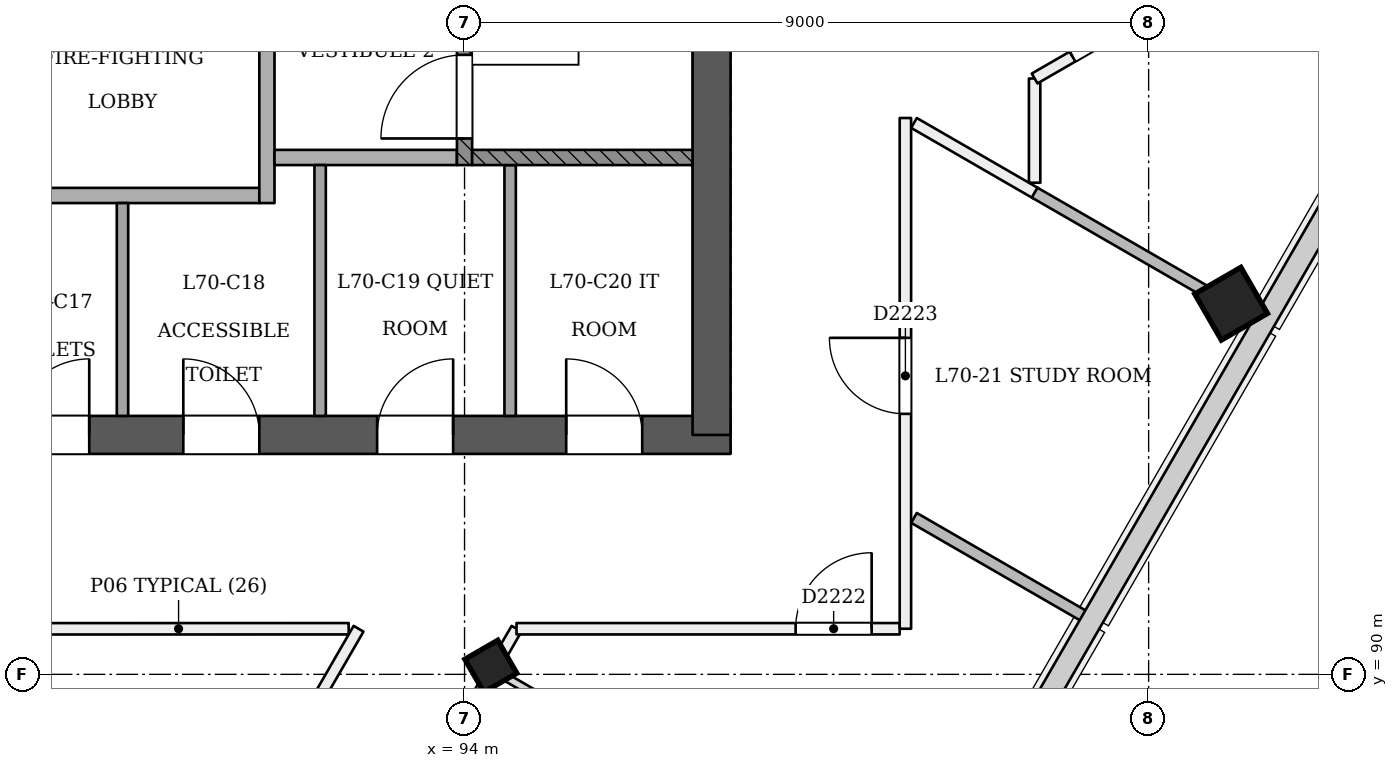
"""IFC4 building model, lengths in metres.
Left out: names, types, materials, properties, quantities, classifications, styles, units other than length and angle.
Written with IfcOpenShell. Run it as: python <this file> out.ifc"""

import sys

from ifc_helpers import new_model, si_unit, direction, frame, frame_2d, origin, origin_2d, place, context, subcontext, project, spatial, rectangle, extrude, element, fill, save


model = new_model("IFC4")
c1 = context("Model", 3, precision=1e-05, world=origin(), true_north=direction((0.0, 1.0)))
c2 = subcontext(c1, "Body", "Model", "MODEL_VIEW")
j1 = project(units=[si_unit("LENGTHUNIT", "METRE"), si_unit("PLANEANGLEUNIT", "RADIAN")], contexts=[c1])
p1 = place(None, origin())
s1 = spatial("IfcSite", under=j1, at=p1, CompositionType="ELEMENT")
p2 = place(p1, origin())
s2 = spatial("IfcBuilding", under=s1, at=p2, CompositionType="ELEMENT")
p3 = place(p2, frame((0.0, 0.0, 271.6)))
s3 = spatial("IfcBuildingStorey", under=s2, at=p3, CompositionType="ELEMENT", Elevation=271.6)
p4 = place(p3, frame((72.75, 93.15, 0.0), z_axis=(0.0, 0.0, 1.0), x_axis=(1.0, 0.0, 0.0)))
e1 = element("IfcWall", 1, at=p4, inside=s3, PredefinedType="SHEAR", context=c2, shape_type="SweptSolid", body=[
    extrude(rectangle(XDim=24.75, YDim=0.5, at=frame_2d((12.375, 0.0))), origin(), (0.0, 0.0, 1.0), 3.6),
])
p5 = place(p4, frame((1.05, 0.0, 0.0)))
e2 = element("IfcOpeningElement", 2, at=p5, cuts=e1, PredefinedType="OPENING", context=c2, shape_type="SweptSolid", body=[
    extrude(rectangle(XDim=1.2, YDim=2.1, at=frame_2d((0.6, 1.05))), frame((0.0, 0.26, 0.0), z_axis=(0.0, -1.0, 0.0), x_axis=(1.0, 0.0, 0.0)), (0.0, 0.0, 1.0), 0.521),
])
p6 = place(p4, frame((3.25, 0.0, 0.0)))
e3 = element("IfcOpeningElement", 3, at=p6, cuts=e1, PredefinedType="OPENING", context=c2, shape_type="SweptSolid", body=[
    extrude(rectangle(XDim=1.2, YDim=2.1, at=frame_2d((0.6, 1.05))), frame((0.0, 0.26, 0.0), z_axis=(0.0, -1.0, 0.0), x_axis=(1.0, 0.0, 0.0)), (0.0, 0.0, 1.0), 0.521),
])
p7 = place(p4, frame((13.25, 0.0, 0.0)))
e4 = element("IfcOpeningElement", 4, at=p7, cuts=e1, PredefinedType="OPENING", context=c2, shape_type="SweptSolid", body=[
    extrude(rectangle(XDim=1.2, YDim=2.1, at=frame_2d((0.6, 1.05))), frame((0.0, 0.26, 0.0), z_axis=(0.0, -1.0, 0.0), x_axis=(1.0, 0.0, 0.0)), (0.0, 0.0, 1.0), 0.521),
])
p8 = place(p4, frame((15.312, 0.0, 0.0)))
e5 = element("IfcOpeningElement", 5, at=p8, cuts=e1, PredefinedType="OPENING", context=c2, shape_type="SweptSolid", body=[
    extrude(rectangle(XDim=1.0, YDim=2.1, at=frame_2d((0.5, 1.05))), frame((0.0, 0.26, 0.0), z_axis=(0.0, -1.0, 0.0), x_axis=(1.0, 0.0, 0.0)), (0.0, 0.0, 1.0), 0.521),
])
p9 = place(p4, frame((17.55, 0.0, 0.0)))
e6 = element("IfcOpeningElement", 6, at=p9, cuts=e1, PredefinedType="OPENING", context=c2, shape_type="SweptSolid", body=[
    extrude(rectangle(XDim=1.0, YDim=2.1, at=frame_2d((0.5, 1.05))), frame((0.0, 0.26, 0.0), z_axis=(0.0, -1.0, 0.0), x_axis=(1.0, 0.0, 0.0)), (0.0, 0.0, 1.0), 0.521),
])
p10 = place(p4, frame((20.1, 0.0, 0.0)))
e7 = element("IfcOpeningElement", 7, at=p10, cuts=e1, PredefinedType="OPENING", context=c2, shape_type="SweptSolid", body=[
    extrude(rectangle(XDim=1.0, YDim=2.1, at=frame_2d((0.5, 1.05))), frame((0.0, 0.26, 0.0), z_axis=(0.0, -1.0, 0.0), x_axis=(1.0, 0.0, 0.0)), (0.0, 0.0, 1.0), 0.521),
])
p11 = place(p4, frame((22.587, 0.0, 0.0)))
e8 = element("IfcOpeningElement", 8, at=p11, cuts=e1, PredefinedType="OPENING", context=c2, shape_type="SweptSolid", body=[
    extrude(rectangle(XDim=1.0, YDim=2.1, at=frame_2d((0.5, 1.05))), frame((0.0, 0.26, 0.0), z_axis=(0.0, -1.0, 0.0), x_axis=(1.0, 0.0, 0.0)), (0.0, 0.0, 1.0), 0.521),
])
p12 = place(p3, frame((97.25, 93.15, 0.0), z_axis=(0.0, 0.0, 1.0), x_axis=(0.0, 1.0, 0.0)))
e9 = element("IfcWall", 9, at=p12, inside=s3, PredefinedType="SHEAR", context=c2, shape_type="SweptSolid", body=[
    extrude(rectangle(XDim=10.75, YDim=0.5, at=frame_2d((5.375, 0.0))), origin(), (0.0, 0.0, 1.0), 3.6),
])
p13 = place(p3, frame((94.373, 90.06, -0.015), z_axis=(-0.02215519141, 0.038415882353, 0.999016199807), x_axis=(-0.500652777817, -0.865364161883, 0.022173483991)))
e10 = element("IfcColumn", 10, at=p13, inside=s3, PredefinedType="COLUMN", context=c2, shape_type="SweptSolid", body=[
    extrude(rectangle(XDim=0.5, YDim=0.5, at=origin_2d()), origin(), (0.0, 0.0, 1.0), 3.604),
])
p14 = place(p3, frame((104.113, 94.829, -0.021), z_axis=(-0.022222852987, 0.038483477124, 0.999012095419), x_axis=(-0.500174611287, -0.865639447942, 0.022219459744)))
e11 = element("IfcColumn", 11, at=p14, inside=s3, PredefinedType="COLUMN", context=c2, shape_type="SweptSolid", body=[
    extrude(rectangle(XDim=0.7, YDim=0.7, at=origin_2d()), origin(), (0.0, 0.0, 1.0), 3.604),
])
p15 = place(p3, frame((88.0, 90.599, 0.0), z_axis=(0.0, 0.0, 1.0), x_axis=(0.99999998661, 0.000163648263, 0.0)))
e12 = element("IfcWall", 12, at=p15, inside=s3, PredefinedType="PARTITIONING", context=c2, shape_type="SweptSolid", body=[
    extrude(rectangle(XDim=4.476, YDim=0.15, at=frame_2d((2.238, 0.0))), origin(), (0.0, 0.0, 1.0), 3.2),
])
p16 = place(p3, frame((92.605, 90.6, 0.0), z_axis=(0.0, 0.0, 1.0), x_axis=(-0.499993840102, -0.866028960174, 0.0)))
e13 = element("IfcWall", 13, at=p16, inside=s3, PredefinedType="PARTITIONING", context=c2, shape_type="SweptSolid", body=[
    extrude(rectangle(XDim=15.081, YDim=0.15, at=frame_2d((7.541, 0.0))), origin(), (0.0, 0.0, 1.0), 3.2),
])
p17 = place(p16, frame((2.769, 0.0, 0.0)))
e14 = element("IfcOpeningElement", 14, at=p17, cuts=e13, PredefinedType="OPENING", context=c2, shape_type="SweptSolid", body=[
    extrude(rectangle(XDim=0.9, YDim=2.1, at=frame_2d((0.45, 1.05))), frame((0.0, 0.085, 0.0), z_axis=(0.0, -1.0, 0.0), x_axis=(1.0, 0.0, 0.0)), (0.0, 0.0, 1.0), 0.171),
])
p18 = place(p3, frame((85.065, 73.939, 0.0), z_axis=(0.0, 0.0, 1.0), x_axis=(0.500004406092, 0.866022859911, 0.0)))
e15 = element("IfcWall", 15, at=p18, inside=s3, PredefinedType="PARTITIONING", context=c2, shape_type="SweptSolid", body=[
    extrude(rectangle(XDim=19.238, YDim=0.15, at=frame_2d((9.619, 0.0))), origin(), (0.0, 0.0, 1.0), 2.8),
])
p19 = place(p18, frame((1.336, 0.0, 0.0)))
e16 = element("IfcOpeningElement", 16, at=p19, cuts=e15, PredefinedType="OPENING", context=c2, shape_type="SweptSolid", body=[
    extrude(rectangle(XDim=1.0, YDim=2.1, at=frame_2d((0.5, 1.05))), frame((0.0, 0.085, 0.0), z_axis=(0.0, -1.0, 0.0), x_axis=(1.0, 0.0, 0.0)), (0.0, 0.0, 1.0), 0.171),
])
p20 = place(p18, frame((10.015, 0.0, 0.0)))
e17 = element("IfcOpeningElement", 17, at=p20, cuts=e15, PredefinedType="OPENING", context=c2, shape_type="SweptSolid", body=[
    extrude(rectangle(XDim=1.2, YDim=2.1, at=frame_2d((0.6, 1.05))), frame((0.0, 0.085, 0.0), z_axis=(0.0, -1.0, 0.0), x_axis=(1.0, 0.0, 0.0)), (0.0, 0.0, 1.0), 0.171),
])
p21 = place(p18, frame((14.836, 0.0, 0.0)))
e18 = element("IfcOpeningElement", 18, at=p21, cuts=e15, PredefinedType="OPENING", context=c2, shape_type="SweptSolid", body=[
    extrude(rectangle(XDim=1.0, YDim=2.1, at=frame_2d((0.5, 1.05))), frame((0.0, 0.085, 0.0), z_axis=(0.0, -1.0, 0.0), x_axis=(1.0, 0.0, 0.0)), (0.0, 0.0, 1.0), 0.171),
])
p22 = place(p3, frame((94.684, 90.6, 0.0), z_axis=(0.0, 0.0, 1.0), x_axis=(1.0, 0.0, 0.0)))
e19 = element("IfcWall", 19, at=p22, inside=s3, PredefinedType="PARTITIONING", context=c2, shape_type="SweptSolid", body=[
    extrude(rectangle(XDim=5.041, YDim=0.15, at=frame_2d((2.521, 0.0))), origin(), (0.0, 0.0, 1.0), 3.2),
])
p23 = place(p22, frame((3.672, 0.0, 0.0)))
e20 = element("IfcOpeningElement", 20, at=p23, cuts=e19, PredefinedType="OPENING", context=c2, shape_type="SweptSolid", body=[
    extrude(rectangle(XDim=1.0, YDim=2.1, at=frame_2d((0.5, 1.05))), frame((0.0, 0.085, 0.0), z_axis=(0.0, -1.0, 0.0), x_axis=(1.0, 0.0, 0.0)), (0.0, 0.0, 1.0), 0.171),
])
p24 = place(p3, frame((99.8, 90.6, 0.0), z_axis=(0.0, 0.0, 1.0), x_axis=(0.0, 1.0, 0.0)))
e21 = element("IfcWall", 21, at=p24, inside=s3, PredefinedType="PARTITIONING", context=c2, shape_type="SweptSolid", body=[
    extrude(rectangle(XDim=6.719, YDim=0.15, at=frame_2d((3.36, 0.0))), origin(), (0.0, 0.0, 1.0), 3.2),
])
p25 = place(p24, frame((2.827, 0.0, 0.0)))
e22 = element("IfcOpeningElement", 22, at=p25, cuts=e21, PredefinedType="OPENING", context=c2, shape_type="SweptSolid", body=[
    extrude(rectangle(XDim=1.0, YDim=2.1, at=frame_2d((0.5, 1.05))), frame((0.0, 0.085, 0.0), z_axis=(0.0, -1.0, 0.0), x_axis=(1.0, 0.0, 0.0)), (0.0, 0.0, 1.0), 0.171),
])
p26 = place(p3, frame((99.913, 97.254, 0.0), z_axis=(0.0, 0.0, 1.0), x_axis=(0.866021029023, -0.500007577232, 0.0)))
e23 = element("IfcWall", 23, at=p26, inside=s3, PredefinedType="PARTITIONING", context=c2, shape_type="SweptSolid", body=[
    extrude(rectangle(XDim=1.853, YDim=0.15, at=frame_2d((0.927, 0.0))), origin(), (0.0, 0.0, 1.0), 3.2),
])
p27 = place(p3, frame((101.5, 96.468, 0.0), z_axis=(0.0, 0.0, 1.0), x_axis=(0.0, 1.0, 0.0)))
e24 = element("IfcWall", 24, at=p27, inside=s3, PredefinedType="PARTITIONING", context=c2, shape_type="SweptSolid", body=[
    extrude(rectangle(XDim=1.371, YDim=0.15, at=frame_2d((0.686, 0.0))), origin(), (0.0, 0.0, 1.0), 3.2),
])
p28 = place(p3, frame((101.5, 97.839, 0.0), z_axis=(0.0, 0.0, 1.0), x_axis=(0.866029041019, 0.499993700073, 0.0)))
e25 = element("IfcWall", 25, at=p28, inside=s3, PredefinedType="PARTITIONING", context=c2, shape_type="SweptSolid", body=[
    extrude(rectangle(XDim=2.078, YDim=0.15, at=frame_2d((1.039, 0.0))), origin(), (0.0, 0.0, 1.0), 3.2),
])
p29 = place(p28, frame((0.576, 0.0, 0.0)))
e26 = element("IfcOpeningElement", 26, at=p29, cuts=e25, PredefinedType="OPENING", context=c2, shape_type="SweptSolid", body=[
    extrude(rectangle(XDim=1.2, YDim=2.1, at=frame_2d((0.6, 1.05))), frame((0.0, 0.085, 0.0), z_axis=(0.0, -1.0, 0.0), x_axis=(1.0, 0.0, 0.0)), (0.0, 0.0, 1.0), 0.171),
])
p30 = place(p3, frame((96.867, 88.621, 0.0), z_axis=(0.0, 0.0, 1.0), x_axis=(-0.866049342339, 0.499958534914, 0.0)))
e27 = element("IfcWall", 27, at=p30, inside=s3, PredefinedType="PARTITIONING", context=c2, shape_type="SweptSolid", body=[
    extrude(rectangle(XDim=2.805, YDim=0.1, at=frame_2d((1.402, 0.0))), origin(), (0.0, 0.0, 1.0), 2.8),
])
p31 = place(p3, frame((102.183, 90.748, 0.0), z_axis=(0.0, 0.0, 1.0), x_axis=(-0.866033583042, 0.499985832843, 0.0)))
e28 = element("IfcWall", 28, at=p31, inside=s3, PredefinedType="PARTITIONING", context=c2, shape_type="SweptSolid", body=[
    extrude(rectangle(XDim=2.621, YDim=0.15, at=frame_2d((1.311, 0.0))), origin(), (0.0, 0.0, 1.0), 2.7),
])
p32 = place(p3, frame((104.415, 94.655, 0.0), z_axis=(0.0, 0.0, 1.0), x_axis=(-0.866011654119, 0.500023814363, 0.0)))
e29 = element("IfcWall", 29, at=p32, inside=s3, PredefinedType="PARTITIONING", context=c2, shape_type="SweptSolid", body=[
    extrude(rectangle(XDim=3.366, YDim=0.15, at=frame_2d((1.683, 0.0))), origin(), (0.0, 0.0, 1.0), 2.7),
])
p33 = place(p3, frame((89.5, 93.4, 0.0), z_axis=(0.0, 0.0, 1.0), x_axis=(0.0, 1.0, 0.0)))
e30 = element("IfcWall", 30, at=p33, inside=s3, PredefinedType="PARTITIONING", context=c2, shape_type="SweptSolid", body=[
    extrude(rectangle(XDim=2.8, YDim=0.15, at=frame_2d((1.4, 0.0))), origin(), (0.0, 0.0, 1.0), 3.2),
])
for number, where, z_axis, x_axis in (
    (31, (92.1, 93.4, 0.0), (0.0, 0.0, 1.0), (0.0, 1.0, 0.0)),
    (32, (94.6, 93.4, 0.0), (0.0, 0.0, 1.0), (0.0, 1.0, 0.0)),
):
    element("IfcWall", number, at=place(p3, frame(where, z_axis=z_axis, x_axis=x_axis)), inside=s3, PredefinedType="PARTITIONING", context=c2, shape_type="SweptSolid", body=[
        extrude(rectangle(XDim=3.3, YDim=0.15, at=frame_2d((1.65, 0.0))), origin(), (0.0, 0.0, 1.0), 3.2),
    ])
p34 = place(p3, frame((87.7, 96.3, 0.0), z_axis=(0.0, 0.0, 1.0), x_axis=(1.0, 0.0, 0.0)))
e33 = element("IfcWall", 33, at=p34, inside=s3, PredefinedType="PARTITIONING", context=c2, shape_type="SweptSolid", body=[
    extrude(rectangle(XDim=3.6, YDim=0.2, at=frame_2d((1.8, 0.0))), origin(), (0.0, 0.0, 1.0), 3.2),
])
p35 = place(p3, frame((91.4, 96.2, 0.0), z_axis=(0.0, 0.0, 1.0), x_axis=(0.0, 1.0, 0.0)))
e34 = element("IfcWall", 34, at=p35, inside=s3, PredefinedType="PARTITIONING", context=c2, shape_type="SweptSolid", body=[
    extrude(rectangle(XDim=4.2, YDim=0.2, at=frame_2d((2.1, 0.0))), origin(), (0.0, 0.0, 1.0), 3.2),
])
p36 = place(p35, frame((2.45, 0.0, 0.0)))
e35 = element("IfcOpeningElement", 35, at=p36, cuts=e34, PredefinedType="OPENING", context=c2, shape_type="SweptSolid", body=[
    extrude(rectangle(XDim=1.1, YDim=2.1, at=frame_2d((0.55, 1.05))), frame((0.0, 0.11, 0.0), z_axis=(0.0, -1.0, 0.0), x_axis=(1.0, 0.0, 0.0)), (0.0, 0.0, 1.0), 0.221),
])
p37 = place(p3, frame((91.5, 96.8, 0.0), z_axis=(0.0, 0.0, 1.0), x_axis=(1.0, 0.0, 0.0)))
e36 = element("IfcWall", 36, at=p37, inside=s3, PredefinedType="PARTITIONING", context=c2, shape_type="SweptSolid", body=[
    extrude(rectangle(XDim=2.4, YDim=0.2, at=frame_2d((1.2, 0.0))), origin(), (0.0, 0.0, 1.0), 3.2),
])
p38 = place(p3, frame((94.0, 96.7, 0.0), z_axis=(0.0, 0.0, 1.0), x_axis=(0.0, 1.0, 0.0)))
e37 = element("IfcWall", 37, at=p38, inside=s3, PredefinedType="SOLIDWALL", context=c2, shape_type="SweptSolid", body=[
    extrude(rectangle(XDim=3.7, YDim=0.2, at=frame_2d((1.85, 0.0))), origin(), (0.0, 0.0, 1.0), 3.2),
])
p39 = place(p38, frame((0.35, 0.0, 0.0)))
e38 = element("IfcOpeningElement", 38, at=p39, cuts=e37, PredefinedType="OPENING", context=c2, shape_type="SweptSolid", body=[
    extrude(rectangle(XDim=1.1, YDim=2.1, at=frame_2d((0.55, 1.05))), frame((0.0, 0.11, 0.0), z_axis=(0.0, -1.0, 0.0), x_axis=(1.0, 0.0, 0.0)), (0.0, 0.0, 1.0), 0.221),
])
p40 = place(p3, frame((94.1, 96.8, 0.0), z_axis=(0.0, 0.0, 1.0), x_axis=(1.0, 0.0, 0.0)))
e39 = element("IfcWall", 39, at=p40, inside=s3, PredefinedType="SOLIDWALL", context=c2, shape_type="SweptSolid", body=[
    extrude(rectangle(XDim=2.9, YDim=0.2, at=frame_2d((1.45, 0.0))), origin(), (0.0, 0.0, 1.0), 3.2),
])
p41 = place(p23, origin())
e40 = element("IfcDoor", 40, at=p41, inside=s3, OperationType="SINGLE_SWING_RIGHT", PredefinedType="NOTDEFINED", context=c2, shape_type="SweptSolid", body=[
    extrude(rectangle(XDim=1.0, YDim=2.1, at=frame_2d((0.5, 1.05))), frame((0.0, 0.025, 0.0), z_axis=(0.0, -1.0, 0.0), x_axis=(1.0, 0.0, 0.0)), (0.0, 0.0, 1.0), 0.05),
])
fill(e20, e40)
p42 = place(p25, origin())
e41 = element("IfcDoor", 41, at=p42, inside=s3, OperationType="SINGLE_SWING_RIGHT", PredefinedType="NOTDEFINED", context=c2, shape_type="SweptSolid", body=[
    extrude(rectangle(XDim=1.0, YDim=2.1, at=frame_2d((0.5, 1.05))), frame((0.0, 0.025, 0.0), z_axis=(0.0, -1.0, 0.0), x_axis=(1.0, 0.0, 0.0)), (0.0, 0.0, 1.0), 0.05),
])
fill(e22, e41)
p43 = place(p29, origin())
e42 = element("IfcDoor", 42, at=p43, inside=s3, OperationType="SINGLE_SWING_LEFT", PredefinedType="NOTDEFINED", context=c2, shape_type="SweptSolid", body=[
    extrude(rectangle(XDim=1.2, YDim=2.1, at=frame_2d((0.6, 1.05))), frame((0.0, 0.025, 0.0), z_axis=(0.0, -1.0, 0.0), x_axis=(1.0, 0.0, 0.0)), (0.0, 0.0, 1.0), 0.05),
])
fill(e26, e42)
p44 = place(p39, origin())
e43 = element("IfcDoor", 43, at=p44, inside=s3, OperationType="SINGLE_SWING_LEFT", PredefinedType="NOTDEFINED", context=c2, shape_type="SweptSolid", body=[
    extrude(rectangle(XDim=1.1, YDim=2.1, at=frame_2d((0.55, 1.05))), frame((0.0, 0.025, 0.0), z_axis=(0.0, -1.0, 0.0), x_axis=(1.0, 0.0, 0.0)), (0.0, 0.0, 1.0), 0.05),
])
fill(e38, e43)
p45 = place(p8, origin())
e44 = element("IfcDoor", 44, at=p45, inside=s3, OperationType="SINGLE_SWING_RIGHT", PredefinedType="NOTDEFINED", context=c2, shape_type="SweptSolid", body=[
    extrude(rectangle(XDim=1.0, YDim=2.1, at=frame_2d((0.5, 1.05))), frame((0.0, 0.025, 0.0), z_axis=(0.0, -1.0, 0.0), x_axis=(1.0, 0.0, 0.0)), (0.0, 0.0, 1.0), 0.05),
])
fill(e5, e44)
p46 = place(p9, origin())
e45 = element("IfcDoor", 45, at=p46, inside=s3, OperationType="SINGLE_SWING_LEFT", PredefinedType="NOTDEFINED", context=c2, shape_type="SweptSolid", body=[
    extrude(rectangle(XDim=1.0, YDim=2.1, at=frame_2d((0.5, 1.05))), frame((0.0, 0.025, 0.0), z_axis=(0.0, -1.0, 0.0), x_axis=(1.0, 0.0, 0.0)), (0.0, 0.0, 1.0), 0.05),
])
fill(e6, e45)
p47 = place(p10, origin())
e46 = element("IfcDoor", 46, at=p47, inside=s3, OperationType="SINGLE_SWING_RIGHT", PredefinedType="NOTDEFINED", context=c2, shape_type="SweptSolid", body=[
    extrude(rectangle(XDim=1.0, YDim=2.1, at=frame_2d((0.5, 1.05))), frame((0.0, 0.025, 0.0), z_axis=(0.0, -1.0, 0.0), x_axis=(1.0, 0.0, 0.0)), (0.0, 0.0, 1.0), 0.05),
])
fill(e7, e46)
p48 = place(p11, origin())
e47 = element("IfcDoor", 47, at=p48, inside=s3, OperationType="SINGLE_SWING_LEFT", PredefinedType="NOTDEFINED", context=c2, shape_type="SweptSolid", body=[
    extrude(rectangle(XDim=1.0, YDim=2.1, at=frame_2d((0.5, 1.05))), frame((0.0, 0.025, 0.0), z_axis=(0.0, -1.0, 0.0), x_axis=(1.0, 0.0, 0.0)), (0.0, 0.0, 1.0), 0.05),
])
fill(e8, e47)
save(model, sys.argv[1])
